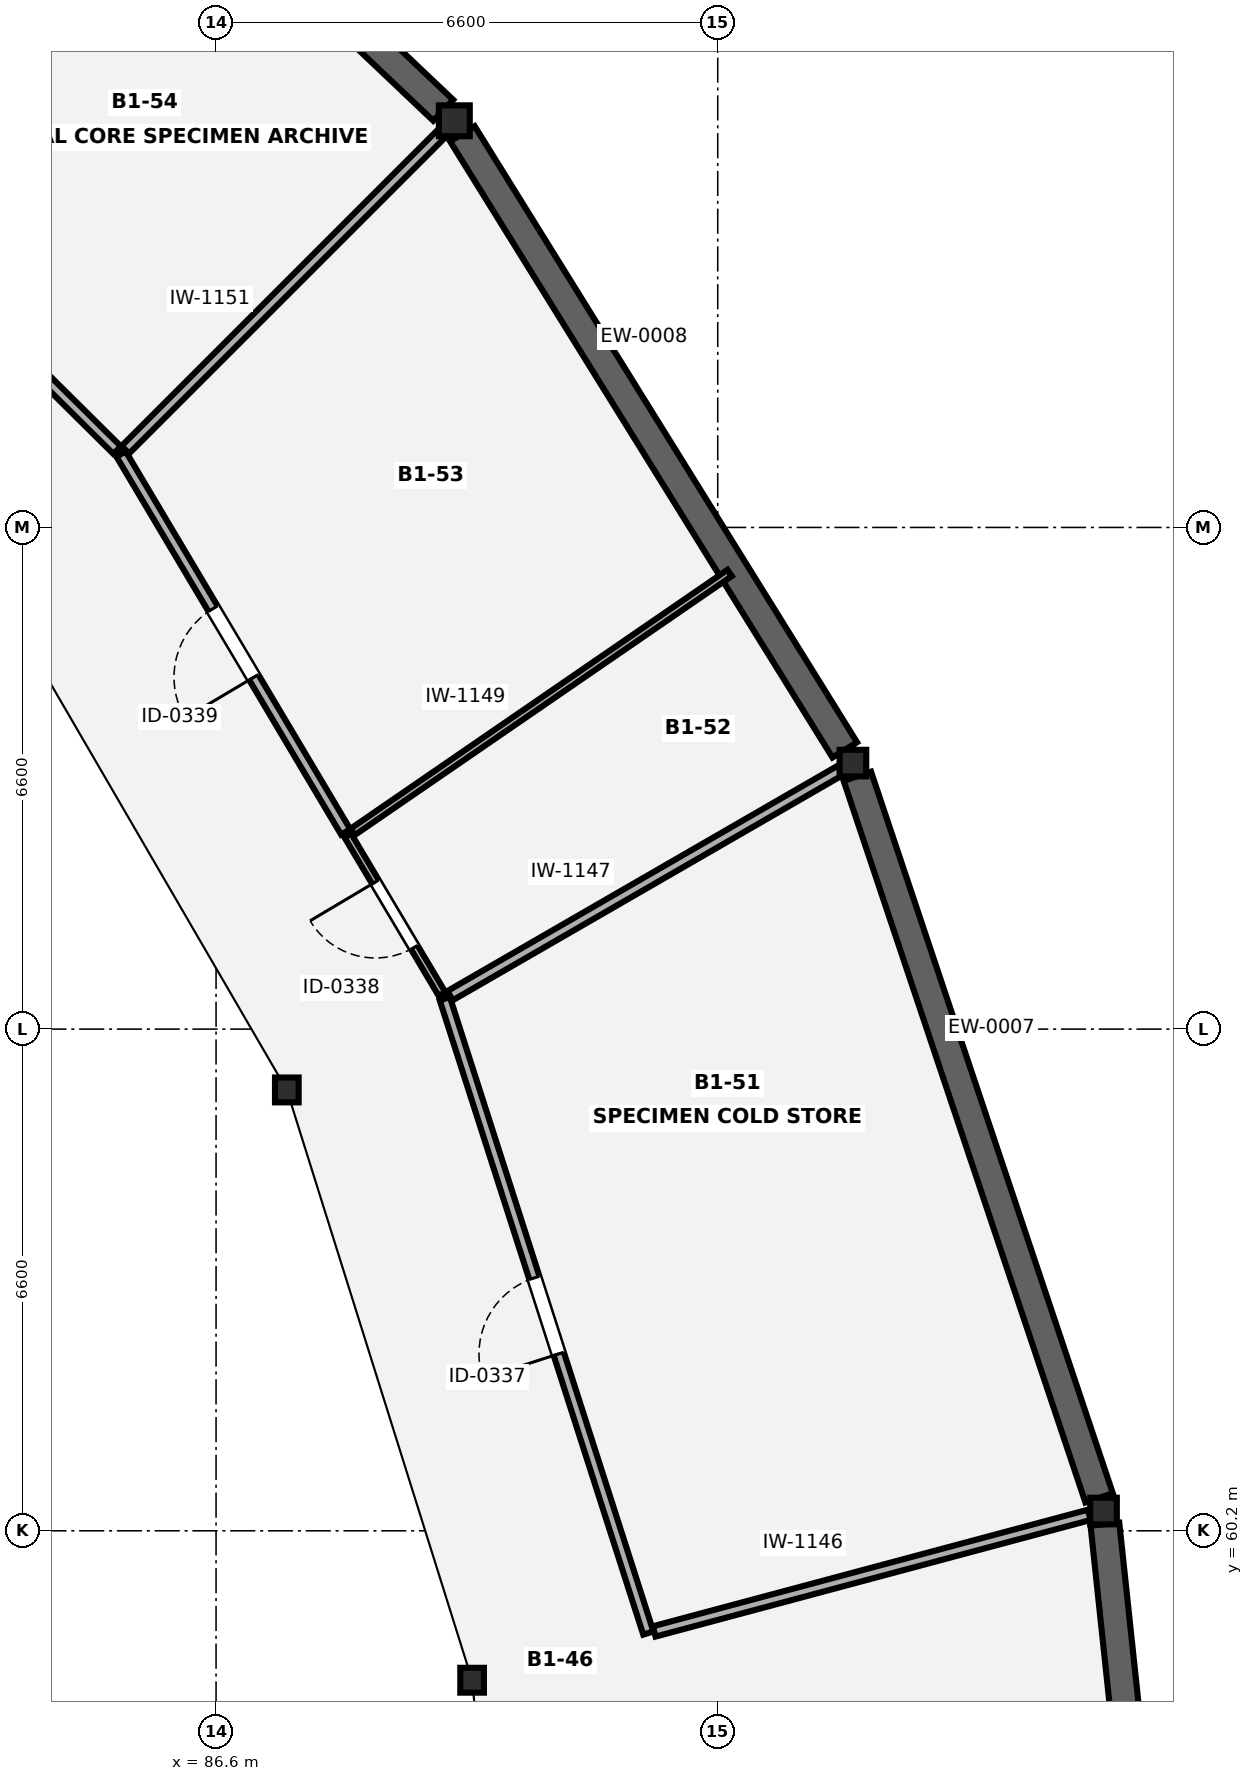
"""IFC4 building model, lengths in metres.
Left out: names, types, materials, properties, quantities, classifications, styles, units other than length and angle.
Written with IfcOpenShell. Run it as: python <this file> out.ifc"""

import sys

from ifc_helpers import new_model, si_unit, direction, frame, frame_2d, origin, origin_2d, place, context, subcontext, project, spatial, rectangle, hollow_circle, i_section, extrude, element, fill, save


model = new_model("IFC4")
c1 = context("Model", 3, precision=1e-05, world=origin(), true_north=direction((0.0, 1.0)))
c2 = subcontext(c1, "Body", "Model", "MODEL_VIEW")
j1 = project(units=[si_unit("LENGTHUNIT", "METRE"), si_unit("PLANEANGLEUNIT", "RADIAN")], contexts=[c1])
p1 = place(None, origin())
s1 = spatial("IfcSite", under=j1, at=p1, CompositionType="ELEMENT")
p2 = place(p1, origin())
s2 = spatial("IfcBuilding", under=s1, at=p2, CompositionType="ELEMENT")
p3 = place(p2, frame((0.0, 0.0, -4.2)))
s3 = spatial("IfcBuildingStorey", under=s2, at=p3, CompositionType="ELEMENT", Elevation=-4.2)
p4 = place(p3, frame((98.276, 60.46, 0.0), z_axis=(0.0, 0.0, 1.0), x_axis=(1.0, 0.0, 0.0)))
e1 = element("IfcColumn", 1, at=p4, inside=s3, PredefinedType="COLUMN", context=c2, shape_type="SweptSolid", body=[
    extrude(i_section(OverallWidth=0.35, OverallDepth=0.35, WebThickness=0.02, FlangeThickness=0.032, FilletRadius=0.016, at=origin_2d()), origin(), (0.0, 0.0, 1.0), 4.2),
])
p5 = place(p3, frame((89.969, 58.234, 0.0), z_axis=(0.0, 0.0, 1.0), x_axis=(1.0, 0.0, 0.0)))
e2 = element("IfcColumn", 2, at=p5, inside=s3, PredefinedType="COLUMN", context=c2, shape_type="SweptSolid", body=[
    extrude(i_section(OverallWidth=0.311, OverallDepth=0.327, WebThickness=0.016, FlangeThickness=0.025, FilletRadius=0.017, at=origin_2d()), origin(), (0.0, 0.0, 1.0), 4.2),
])
p6 = place(p3, frame((94.979, 70.3, 0.0), z_axis=(0.0, 0.0, 1.0), x_axis=(1.0, 0.0, 0.0)))
e3 = element("IfcColumn", 3, at=p6, inside=s3, PredefinedType="COLUMN", context=c2, shape_type="SweptSolid", body=[
    extrude(i_section(OverallWidth=0.35, OverallDepth=0.35, WebThickness=0.02, FlangeThickness=0.032, FilletRadius=0.016, at=origin_2d()), origin(), (0.0, 0.0, 1.0), 4.2),
])
p7 = place(p3, frame((87.531, 66.0, 0.0), z_axis=(0.0, 0.0, 1.0), x_axis=(1.0, 0.0, 0.0)))
e4 = element("IfcColumn", 4, at=p7, inside=s3, PredefinedType="COLUMN", context=c2, shape_type="SweptSolid", body=[
    extrude(i_section(OverallWidth=0.311, OverallDepth=0.327, WebThickness=0.016, FlangeThickness=0.025, FilletRadius=0.017, at=origin_2d()), origin(), (0.0, 0.0, 1.0), 4.2),
])
p8 = place(p3, frame((89.735, 78.75, 0.0), z_axis=(0.0, 0.0, 1.0), x_axis=(1.0, 0.0, 0.0)))
e5 = element("IfcColumn", 5, at=p8, inside=s3, PredefinedType="COLUMN", context=c2, shape_type="SweptSolid", body=[
    extrude(hollow_circle(Radius=0.203, WallThickness=0.013, at=origin_2d()), origin(), (0.0, 0.0, 1.0), 4.2),
])
p9 = place(p3, frame((98.294, 60.287, 0.0), z_axis=(0.0, 0.0, 1.0), x_axis=(0.105884325246, -0.994378453944, 0.0)))
e6 = element("IfcWall", 6, at=p9, inside=s3, PredefinedType="USERDEFINED", context=c2, shape_type="SweptSolid", body=[
    extrude(rectangle(XDim=10.244, YDim=0.38, at=frame_2d((5.122, 0.0))), origin(), (0.0, 0.0, 1.0), 3.9),
])
p10 = place(p3, frame((95.037, 70.127, 0.0), z_axis=(0.0, 0.0, 1.0), x_axis=(0.31766112258, -0.948204308787, 0.0)))
e7 = element("IfcWall", 7, at=p10, inside=s3, PredefinedType="USERDEFINED", context=c2, shape_type="SweptSolid", body=[
    extrude(rectangle(XDim=10.013, YDim=0.38, at=frame_2d((5.006, 0.0))), origin(), (0.0, 0.0, 1.0), 3.9),
])
p11 = place(p3, frame((89.841, 78.579, 0.0), z_axis=(0.0, 0.0, 1.0), x_axis=(0.527316356641, -0.849669029693, 0.0)))
e8 = element("IfcWall", 8, at=p11, inside=s3, PredefinedType="USERDEFINED", context=c2, shape_type="SweptSolid", body=[
    extrude(rectangle(XDim=9.54, YDim=0.38, at=frame_2d((4.77, 0.0))), origin(), (0.0, 0.0, 1.0), 3.9),
])
p12 = place(p3, frame((83.073, 85.069, 0.0), z_axis=(0.0, 0.0, 1.0), x_axis=(0.725471007772, -0.688252727479, 0.0)))
e9 = element("IfcWall", 9, at=p12, inside=s3, PredefinedType="USERDEFINED", context=c2, shape_type="SweptSolid", body=[
    extrude(rectangle(XDim=8.98, YDim=0.38, at=frame_2d((4.49, 0.0))), origin(), (0.0, 0.0, 1.0), 3.9),
])
p13 = place(p3, frame((92.287, 58.855, 0.0), z_axis=(0.0, 0.0, 1.0), x_axis=(-0.30548522006, 0.952196818061, 0.0)))
e10 = element("IfcWall", 10, at=p13, inside=s3, PredefinedType="PARTITIONING", context=c2, shape_type="SweptSolid", body=[
    extrude(rectangle(XDim=8.764, YDim=0.14, at=frame_2d((4.382, 0.0))), origin(), (0.0, 0.0, 1.0), 3.94),
])
p14 = place(p13, frame((3.857, 0.0, 0.0)))
e11 = element("IfcOpeningElement", 11, at=p14, cuts=e10, PredefinedType="OPENING", context=c2, shape_type="SweptSolid", body=[
    extrude(rectangle(XDim=1.05, YDim=2.15, at=frame_2d((0.525, 1.075))), frame((0.0, 0.08, 0.0), z_axis=(0.0, -1.0, 0.0), x_axis=(1.0, 0.0, 0.0)), (0.0, 0.0, 1.0), 0.16),
])
p15 = place(p3, frame((92.364, 58.876, 0.0), z_axis=(0.0, 0.0, 1.0), x_axis=(0.96592653509, 0.258816399805, 0.0)))
e12 = element("IfcWall", 12, at=p15, inside=s3, PredefinedType="PARTITIONING", context=c2, shape_type="SweptSolid", body=[
    extrude(rectangle(XDim=5.926, YDim=0.14, at=frame_2d((2.963, 0.0))), origin(), (0.0, 0.0, 1.0), 3.323),
])
p16 = place(p3, frame((89.679, 67.24, 0.0), z_axis=(0.0, 0.0, 1.0), x_axis=(0.866015384634, 0.500017353277, 0.0)))
e13 = element("IfcWall", 13, at=p16, inside=s3, PredefinedType="PARTITIONING", context=c2, shape_type="SweptSolid", body=[
    extrude(rectangle(XDim=5.924, YDim=0.14, at=frame_2d((2.962, 0.0))), origin(), (0.0, 0.0, 1.0), 3.392),
])
p17 = place(p3, frame((89.573, 67.262, 0.0), z_axis=(0.0, 0.0, 1.0), x_axis=(-0.510928867953, 0.859622994046, 0.0)))
e14 = element("IfcWall", 14, at=p17, inside=s3, PredefinedType="PARTITIONING", context=c2, shape_type="SweptSolid", body=[
    extrude(rectangle(XDim=2.429, YDim=0.1, at=frame_2d((1.214, 0.0))), origin(), (0.0, 0.0, 1.0), 3.94),
])
p18 = place(p17, frame((0.714, 0.0, 0.0)))
e15 = element("IfcOpeningElement", 15, at=p18, cuts=e14, PredefinedType="OPENING", context=c2, shape_type="SweptSolid", body=[
    extrude(rectangle(XDim=1.0, YDim=2.1, at=frame_2d((0.5, 1.05))), frame((0.0, 0.06, 0.0), z_axis=(0.0, -1.0, 0.0), x_axis=(1.0, 0.0, 0.0)), (0.0, 0.0, 1.0), 0.12),
])
p19 = place(p3, frame((88.398, 69.395, 0.0), z_axis=(0.0, 0.0, 1.0), x_axis=(0.824271584206, 0.566194626847, 0.0)))
e16 = element("IfcWall", 16, at=p19, inside=s3, PredefinedType="PARTITIONING", context=c2, shape_type="SweptSolid", body=[
    extrude(rectangle(XDim=6.016, YDim=0.1, at=frame_2d((3.008, 0.0))), origin(), (0.0, 0.0, 1.0), 3.94),
])
p20 = place(p3, frame((88.305, 69.395, 0.0), z_axis=(0.0, 0.0, 1.0), x_axis=(-0.510896676259, 0.859642126811, 0.0)))
e17 = element("IfcWall", 17, at=p20, inside=s3, PredefinedType="PARTITIONING", context=c2, shape_type="SweptSolid", body=[
    extrude(rectangle(XDim=5.783, YDim=0.14, at=frame_2d((2.892, 0.0))), origin(), (0.0, 0.0, 1.0), 3.94),
])
p21 = place(p20, frame((2.366, 0.0, 0.0)))
e18 = element("IfcOpeningElement", 18, at=p21, cuts=e17, PredefinedType="OPENING", context=c2, shape_type="SweptSolid", body=[
    extrude(rectangle(XDim=1.05, YDim=2.15, at=frame_2d((0.525, 1.075))), frame((0.0, 0.08, 0.0), z_axis=(0.0, -1.0, 0.0), x_axis=(1.0, 0.0, 0.0)), (0.0, 0.0, 1.0), 0.16),
])
p22 = place(p3, frame((85.407, 74.423, 0.0), z_axis=(0.0, 0.0, 1.0), x_axis=(0.707127390836, 0.707086170936, 0.0)))
e19 = element("IfcWall", 19, at=p22, inside=s3, PredefinedType="PARTITIONING", context=c2, shape_type="SweptSolid", body=[
    extrude(rectangle(XDim=5.923, YDim=0.14, at=frame_2d((2.961, 0.0))), origin(), (0.0, 0.0, 1.0), 3.392),
])
p23 = place(p3, frame((85.299, 74.417, 0.0), z_axis=(0.0, 0.0, 1.0), x_axis=(-0.710410596589, 0.703787456732, 0.0)))
e20 = element("IfcWall", 20, at=p23, inside=s3, PredefinedType="PARTITIONING", context=c2, shape_type="SweptSolid", body=[
    extrude(rectangle(XDim=7.741, YDim=0.14, at=frame_2d((3.871, 0.0))), origin(), (0.0, 0.0, 1.0), 3.94),
])
p24 = place(p23, frame((3.345, 0.0, 0.0)))
e21 = element("IfcOpeningElement", 21, at=p24, cuts=e20, PredefinedType="OPENING", context=c2, shape_type="SweptSolid", body=[
    extrude(rectangle(XDim=1.05, YDim=2.15, at=frame_2d((0.525, 1.075))), frame((0.0, 0.08, 0.0), z_axis=(0.0, -1.0, 0.0), x_axis=(1.0, 0.0, 0.0)), (0.0, 0.0, 1.0), 0.16),
])
p25 = place(p14, origin())
e22 = element("IfcDoor", 22, at=p25, inside=s3, OperationType="SINGLE_SWING_LEFT", PredefinedType="DOOR", context=c2, shape_type="SweptSolid", body=[
    extrude(rectangle(XDim=1.05, YDim=2.15, at=frame_2d((0.525, 1.075))), frame((0.0, 0.025, 0.0), z_axis=(0.0, -1.0, 0.0), x_axis=(1.0, 0.0, 0.0)), (0.0, 0.0, 1.0), 0.05),
])
fill(e11, e22)
p26 = place(p18, origin())
e23 = element("IfcDoor", 23, at=p26, inside=s3, OperationType="SINGLE_SWING_RIGHT", PredefinedType="DOOR", context=c2, shape_type="SweptSolid", body=[
    extrude(rectangle(XDim=1.0, YDim=2.1, at=frame_2d((0.5, 1.05))), frame((0.0, 0.025, 0.0), z_axis=(0.0, -1.0, 0.0), x_axis=(1.0, 0.0, 0.0)), (0.0, 0.0, 1.0), 0.05),
])
fill(e15, e23)
p27 = place(p21, origin())
e24 = element("IfcDoor", 24, at=p27, inside=s3, OperationType="SINGLE_SWING_LEFT", PredefinedType="DOOR", context=c2, shape_type="SweptSolid", body=[
    extrude(rectangle(XDim=1.05, YDim=2.15, at=frame_2d((0.525, 1.075))), frame((0.0, 0.025, 0.0), z_axis=(0.0, -1.0, 0.0), x_axis=(1.0, 0.0, 0.0)), (0.0, 0.0, 1.0), 0.05),
])
fill(e18, e24)
save(model, sys.argv[1])
